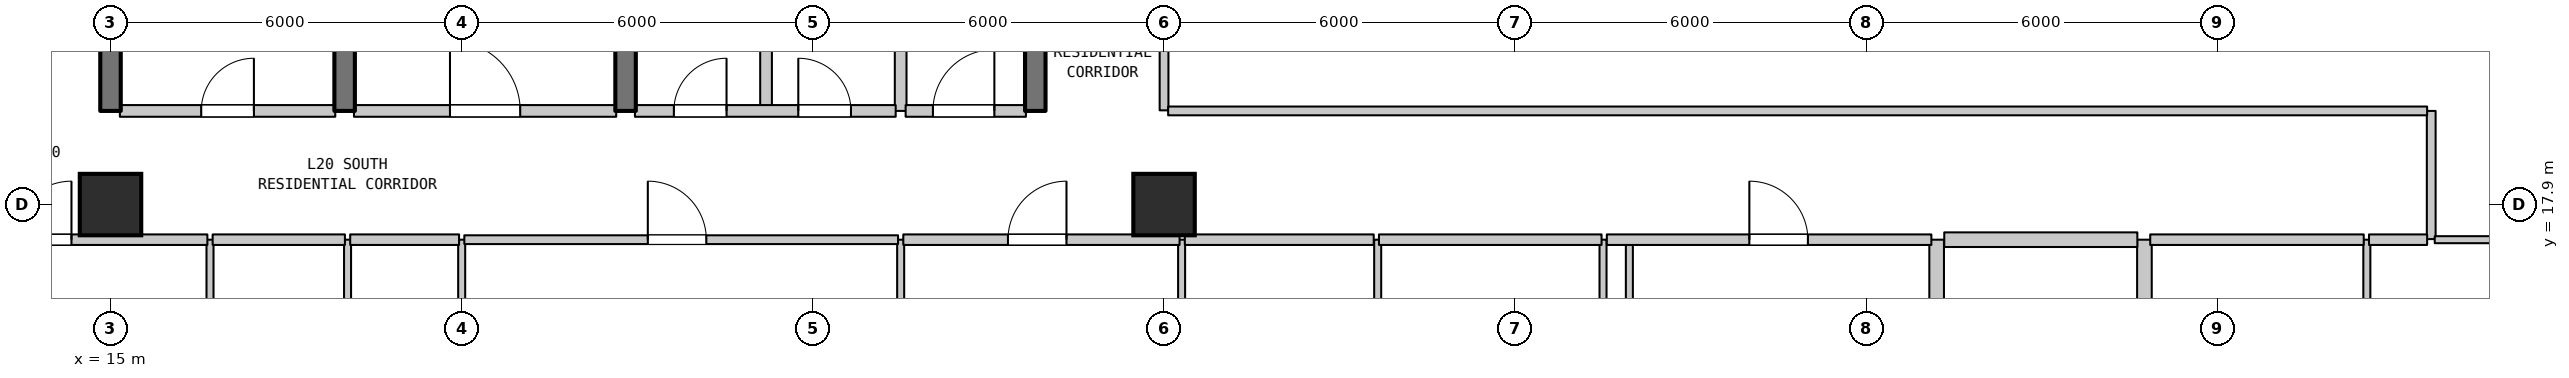
"""IFC4 building model, lengths in metres.
Left out: names, types, materials, properties, quantities, classifications, styles, units other than length and angle.
Written with IfcOpenShell. Run it as: python <this file> out.ifc"""

import sys

from ifc_helpers import new_model, si_unit, direction, frame, frame_2d, origin, origin_2d, place, context, subcontext, project, spatial, rectangle, extrude, element, fill, save


model = new_model("IFC4")
c1 = context("Model", 3, precision=1e-05, world=origin(), true_north=direction((0.0, 1.0)))
c2 = subcontext(c1, "Body", "Model", "MODEL_VIEW")
j1 = project(units=[si_unit("LENGTHUNIT", "METRE"), si_unit("PLANEANGLEUNIT", "RADIAN")], contexts=[c1])
p1 = place(None, origin())
s1 = spatial("IfcSite", under=j1, at=p1, CompositionType="ELEMENT")
p2 = place(p1, origin())
s2 = spatial("IfcBuilding", under=s1, at=p2, CompositionType="ELEMENT")
p3 = place(p2, frame((0.0, 0.0, 86.4)))
s3 = spatial("IfcBuildingStorey", under=s2, at=p3, CompositionType="ELEMENT", Elevation=86.4)
for number, where, z_axis, x_axis in (
    (1, (15.0, 17.9, 0.0), (0.0, 0.0, 1.0), (1.0, 0.0, 0.0)),
    (2, (33.0, 17.9, 0.0), (0.0, 0.0, 1.0), (1.0, 0.0, 0.0)),
):
    element("IfcColumn", number, at=place(p3, frame(where, z_axis=z_axis, x_axis=x_axis)), inside=s3, PredefinedType="COLUMN", context=c2, shape_type="SweptSolid", body=[
        extrude(rectangle(XDim=1.05, YDim=1.05, at=origin_2d()), origin(), (0.0, 0.0, 1.0), 4.5),
    ])
p4 = place(p3, frame((15.0, 19.5, 0.0), z_axis=(0.0, 0.0, 1.0), x_axis=(0.0, 1.0, 0.0)))
e3 = element("IfcWall", 3, at=p4, inside=s3, PredefinedType="SHEAR", context=c2, shape_type="SweptSolid", body=[
    extrude(rectangle(XDim=3.2, YDim=0.35, at=frame_2d((1.6, 0.0))), origin(), (0.0, 0.0, 1.0), 4.185),
])
p5 = place(p3, frame((16.7, 14.1, 0.0), z_axis=(0.0, 0.0, 1.0), x_axis=(0.0, 1.0, 0.0)))
e4 = element("IfcWall", 4, at=p5, inside=s3, PredefinedType="PARTITIONING", context=c2, shape_type="SweptSolid", body=[
    extrude(rectangle(XDim=3.2, YDim=0.12, at=frame_2d((1.6, 0.0))), origin(), (0.0, 0.0, 1.0), 4.185),
])
p6 = place(p5, frame((1.15, 0.0, 0.0)))
e5 = element("IfcOpeningElement", 5, at=p6, cuts=e4, PredefinedType="OPENING", context=c2, shape_type="SweptSolid", body=[
    extrude(rectangle(XDim=0.9, YDim=2.15, at=frame_2d((0.45, 1.075))), frame((0.0, 0.07, 0.0), z_axis=(0.0, -1.0, 0.0), x_axis=(1.0, 0.0, 0.0)), (0.0, 0.0, 1.0), 0.14),
])
p7 = place(p3, frame((19.0, 19.5, 0.0), z_axis=(0.0, 0.0, 1.0), x_axis=(0.0, 1.0, 0.0)))
e6 = element("IfcWall", 6, at=p7, inside=s3, PredefinedType="SHEAR", context=c2, shape_type="SweptSolid", body=[
    extrude(rectangle(XDim=3.2, YDim=0.35, at=frame_2d((1.6, 0.0))), origin(), (0.0, 0.0, 1.0), 4.185),
])
p8 = place(p3, frame((19.05, 14.1, 0.0), z_axis=(0.0, 0.0, 1.0), x_axis=(0.0, 1.0, 0.0)))
e7 = element("IfcWall", 7, at=p8, inside=s3, PredefinedType="PARTITIONING", context=c2, shape_type="SweptSolid", body=[
    extrude(rectangle(XDim=3.2, YDim=0.12, at=frame_2d((1.6, 0.0))), origin(), (0.0, 0.0, 1.0), 4.185),
])
p9 = place(p3, frame((21.0, 6.71, 0.0), z_axis=(0.0, 0.0, 1.0), x_axis=(0.0, 1.0, 0.0)))
e8 = element("IfcWall", 8, at=p9, inside=s3, PredefinedType="PARTITIONING", context=c2, shape_type="SweptSolid", body=[
    extrude(rectangle(XDim=10.59, YDim=0.12, at=frame_2d((5.295, 0.0))), origin(), (0.0, 0.0, 1.0), 4.185),
])
p10 = place(p3, frame((23.8, 19.5, 0.0), z_axis=(0.0, 0.0, 1.0), x_axis=(0.0, 1.0, 0.0)))
e9 = element("IfcWall", 9, at=p10, inside=s3, PredefinedType="SHEAR", context=c2, shape_type="SweptSolid", body=[
    extrude(rectangle(XDim=3.2, YDim=0.35, at=frame_2d((1.6, 0.0))), origin(), (0.0, 0.0, 1.0), 4.185),
])
p11 = place(p3, frame((26.2, 19.5, 0.0), z_axis=(0.0, 0.0, 1.0), x_axis=(0.0, 1.0, 0.0)))
e10 = element("IfcWall", 10, at=p11, inside=s3, PredefinedType="STANDARD", context=c2, shape_type="SweptSolid", body=[
    extrude(rectangle(XDim=3.2, YDim=0.2, at=frame_2d((1.6, 0.0))), origin(), (0.0, 0.0, 1.0), 4.185),
])
p12 = place(p3, frame((28.5, 14.85, 0.0), z_axis=(0.0, 0.0, 1.0), x_axis=(0.0, 1.0, 0.0)))
e11 = element("IfcWall", 11, at=p12, inside=s3, PredefinedType="PARTITIONING", context=c2, shape_type="SweptSolid", body=[
    extrude(rectangle(XDim=2.45, YDim=0.12, at=frame_2d((1.225, 0.0))), origin(), (0.0, 0.0, 1.0), 4.185),
])
p13 = place(p3, frame((28.5, 19.5, 0.0), z_axis=(0.0, 0.0, 1.0), x_axis=(0.0, 1.0, 0.0)))
e12 = element("IfcWall", 12, at=p13, inside=s3, PredefinedType="STANDARD", context=c2, shape_type="SweptSolid", body=[
    extrude(rectangle(XDim=3.2, YDim=0.2, at=frame_2d((1.6, 0.0))), origin(), (0.0, 0.0, 1.0), 4.185),
])
p14 = place(p3, frame((30.8, 19.5, 0.0), z_axis=(0.0, 0.0, 1.0), x_axis=(0.0, 1.0, 0.0)))
e13 = element("IfcWall", 13, at=p14, inside=s3, PredefinedType="SHEAR", context=c2, shape_type="SweptSolid", body=[
    extrude(rectangle(XDim=3.2, YDim=0.35, at=frame_2d((1.6, 0.0))), origin(), (0.0, 0.0, 1.0), 4.185),
])
p15 = place(p3, frame((33.0, 19.51, 0.0), z_axis=(0.0, 0.0, 1.0), x_axis=(0.0, 1.0, 0.0)))
e14 = element("IfcWall", 14, at=p15, inside=s3, PredefinedType="STANDARD", context=c2, shape_type="SweptSolid", body=[
    extrude(rectangle(XDim=6.18, YDim=0.15, at=frame_2d((3.09, 0.0))), origin(), (0.0, 0.0, 1.0), 3.735),
])
for number, where, z_axis, x_axis in (
    (15, (33.3, 11.15, 0.0), (0.0, 0.0, 1.0), (0.0, 1.0, 0.0)),
    (16, (36.65, 11.15, 0.0), (0.0, 0.0, 1.0), (0.0, 1.0, 0.0)),
    (17, (40.5, 11.15, 0.0), (0.0, 0.0, 1.0), (0.0, 1.0, 0.0)),
):
    element("IfcWall", number, at=place(p3, frame(where, z_axis=z_axis, x_axis=x_axis)), inside=s3, PredefinedType="PARTITIONING", context=c2, shape_type="SweptSolid", body=[
        extrude(rectangle(XDim=6.15, YDim=0.12, at=frame_2d((3.075, 0.0))), origin(), (0.0, 0.0, 1.0), 4.185),
    ])
p16 = place(p3, frame((40.95, 14.85, 0.0), z_axis=(0.0, 0.0, 1.0), x_axis=(0.0, 1.0, 0.0)))
e18 = element("IfcWall", 18, at=p16, inside=s3, PredefinedType="PARTITIONING", context=c2, shape_type="SweptSolid", body=[
    extrude(rectangle(XDim=2.45, YDim=0.12, at=frame_2d((1.225, 0.0))), origin(), (0.0, 0.0, 1.0), 4.185),
])
for number, where, z_axis, x_axis in (
    (19, (46.2, 11.15, 0.0), (0.0, 0.0, 1.0), (0.0, 1.0, 0.0)),
    (20, (49.75, 11.15, 0.0), (0.0, 0.0, 1.0), (0.0, 1.0, 0.0)),
):
    element("IfcWall", number, at=place(p3, frame(where, z_axis=z_axis, x_axis=x_axis)), inside=s3, PredefinedType="STANDARD", context=c2, shape_type="SweptSolid", body=[
        extrude(rectangle(XDim=6.15, YDim=0.25, at=frame_2d((3.075, 0.0))), origin(), (0.0, 0.0, 1.0), 4.185),
    ])
p17 = place(p3, frame((53.55, 11.15, 0.0), z_axis=(0.0, 0.0, 1.0), x_axis=(0.0, 1.0, 0.0)))
e21 = element("IfcWall", 21, at=p17, inside=s3, PredefinedType="PARTITIONING", context=c2, shape_type="SweptSolid", body=[
    extrude(rectangle(XDim=6.15, YDim=0.12, at=frame_2d((3.075, 0.0))), origin(), (0.0, 0.0, 1.0), 4.185),
])
p18 = place(p3, frame((54.65, 17.31, 0.0), z_axis=(0.0, 0.0, 1.0), x_axis=(0.0, 1.0, 0.0)))
e22 = element("IfcWall", 22, at=p18, inside=s3, PredefinedType="STANDARD", context=c2, shape_type="SweptSolid", body=[
    extrude(rectangle(XDim=2.19, YDim=0.15, at=frame_2d((1.095, 0.0))), origin(), (0.0, 0.0, 1.0), 4.185),
])
p19 = place(p3, frame((12.875, 17.3, 0.0), z_axis=(0.0, 0.0, 1.0), x_axis=(1.0, 0.0, 0.0)))
e23 = element("IfcWall", 23, at=p19, inside=s3, PredefinedType="STANDARD", context=c2, shape_type="SweptSolid", body=[
    extrude(rectangle(XDim=3.78, YDim=0.18, at=frame_2d((1.89, 0.0))), origin(), (0.0, 0.0, 1.0), 4.185),
])
p20 = place(p19, frame((0.458, 0.0, 0.0)))
e24 = element("IfcOpeningElement", 24, at=p20, cuts=e23, PredefinedType="OPENING", context=c2, shape_type="SweptSolid", body=[
    extrude(rectangle(XDim=1.0, YDim=2.15, at=frame_2d((0.5, 1.075))), frame((0.0, 0.1, 0.0), z_axis=(0.0, -1.0, 0.0), x_axis=(1.0, 0.0, 0.0)), (0.0, 0.0, 1.0), 0.2),
])
p21 = place(p3, frame((16.745, 17.3, 0.0), z_axis=(0.0, 0.0, 1.0), x_axis=(1.0, 0.0, 0.0)))
e25 = element("IfcWall", 25, at=p21, inside=s3, PredefinedType="STANDARD", context=c2, shape_type="SweptSolid", body=[
    extrude(rectangle(XDim=2.26, YDim=0.18, at=frame_2d((1.13, 0.0))), origin(), (0.0, 0.0, 1.0), 4.185),
])
p22 = place(p3, frame((19.095, 17.3, 0.0), z_axis=(0.0, 0.0, 1.0), x_axis=(1.0, 0.0, 0.0)))
e26 = element("IfcWall", 26, at=p22, inside=s3, PredefinedType="STANDARD", context=c2, shape_type="SweptSolid", body=[
    extrude(rectangle(XDim=1.86, YDim=0.18, at=frame_2d((0.93, 0.0))), origin(), (0.0, 0.0, 1.0), 4.185),
])
p23 = place(p3, frame((21.045, 17.3, 0.0), z_axis=(0.0, 0.0, 1.0), x_axis=(1.0, 0.0, 0.0)))
e27 = element("IfcWall", 27, at=p23, inside=s3, PredefinedType="STANDARD", context=c2, shape_type="SweptSolid", body=[
    extrude(rectangle(XDim=7.41, YDim=0.15, at=frame_2d((3.705, 0.0))), origin(), (0.0, 0.0, 1.0), 4.185),
])
p24 = place(p23, frame((3.135, 0.0, 0.0)))
e28 = element("IfcOpeningElement", 28, at=p24, cuts=e27, PredefinedType="OPENING", context=c2, shape_type="SweptSolid", body=[
    extrude(rectangle(XDim=1.0, YDim=2.15, at=frame_2d((0.5, 1.075))), frame((0.0, 0.085, 0.0), z_axis=(0.0, -1.0, 0.0), x_axis=(1.0, 0.0, 0.0)), (0.0, 0.0, 1.0), 0.17),
])
p25 = place(p3, frame((28.545, 17.3, 0.0), z_axis=(0.0, 0.0, 1.0), x_axis=(1.0, 0.0, 0.0)))
e29 = element("IfcWall", 29, at=p25, inside=s3, PredefinedType="STANDARD", context=c2, shape_type="SweptSolid", body=[
    extrude(rectangle(XDim=4.72, YDim=0.18, at=frame_2d((2.36, 0.0))), origin(), (0.0, 0.0, 1.0), 4.185),
])
p26 = place(p25, frame((1.788, 0.0, 0.0)))
e30 = element("IfcOpeningElement", 30, at=p26, cuts=e29, PredefinedType="OPENING", context=c2, shape_type="SweptSolid", body=[
    extrude(rectangle(XDim=1.0, YDim=2.15, at=frame_2d((0.5, 1.075))), frame((0.0, 0.1, 0.0), z_axis=(0.0, -1.0, 0.0), x_axis=(1.0, 0.0, 0.0)), (0.0, 0.0, 1.0), 0.2),
])
p27 = place(p3, frame((33.355, 17.3, 0.0), z_axis=(0.0, 0.0, 1.0), x_axis=(1.0, 0.0, 0.0)))
e31 = element("IfcWall", 31, at=p27, inside=s3, PredefinedType="STANDARD", context=c2, shape_type="SweptSolid", body=[
    extrude(rectangle(XDim=3.227, YDim=0.18, at=frame_2d((1.614, 0.0))), origin(), (0.0, 0.0, 1.0), 4.185),
])
p28 = place(p3, frame((36.672, 17.3, 0.0), z_axis=(0.0, 0.0, 1.0), x_axis=(1.0, 0.0, 0.0)))
e32 = element("IfcWall", 32, at=p28, inside=s3, PredefinedType="STANDARD", context=c2, shape_type="SweptSolid", body=[
    extrude(rectangle(XDim=3.803, YDim=0.18, at=frame_2d((1.901, 0.0))), origin(), (0.0, 0.0, 1.0), 4.185),
])
p29 = place(p3, frame((40.565, 17.3, 0.0), z_axis=(0.0, 0.0, 1.0), x_axis=(1.0, 0.0, 0.0)))
e33 = element("IfcWall", 33, at=p29, inside=s3, PredefinedType="STANDARD", context=c2, shape_type="SweptSolid", body=[
    extrude(rectangle(XDim=5.545, YDim=0.18, at=frame_2d((2.772, 0.0))), origin(), (0.0, 0.0, 1.0), 4.185),
])
p30 = place(p29, frame((2.435, 0.0, 0.0)))
e34 = element("IfcOpeningElement", 34, at=p30, cuts=e33, PredefinedType="OPENING", context=c2, shape_type="SweptSolid", body=[
    extrude(rectangle(XDim=1.0, YDim=2.15, at=frame_2d((0.5, 1.075))), frame((0.0, 0.1, 0.0), z_axis=(0.0, -1.0, 0.0), x_axis=(1.0, 0.0, 0.0)), (0.0, 0.0, 1.0), 0.2),
])
p31 = place(p3, frame((46.33, 17.3, 0.0), z_axis=(0.0, 0.0, 1.0), x_axis=(1.0, 0.0, 0.0)))
e35 = element("IfcWall", 35, at=p31, inside=s3, PredefinedType="STANDARD", context=c2, shape_type="SweptSolid", body=[
    extrude(rectangle(XDim=3.299, YDim=0.25, at=frame_2d((1.649, 0.0))), origin(), (0.0, 0.0, 1.0), 4.185),
])
p32 = place(p3, frame((49.849, 17.3, 0.0), z_axis=(0.0, 0.0, 1.0), x_axis=(1.0, 0.0, 0.0)))
e36 = element("IfcWall", 36, at=p32, inside=s3, PredefinedType="STANDARD", context=c2, shape_type="SweptSolid", body=[
    extrude(rectangle(XDim=3.648, YDim=0.18, at=frame_2d((1.824, 0.0))), origin(), (0.0, 0.0, 1.0), 4.185),
])
p33 = place(p3, frame((53.587, 17.3, 0.0), z_axis=(0.0, 0.0, 1.0), x_axis=(1.0, 0.0, 0.0)))
e37 = element("IfcWall", 37, at=p33, inside=s3, PredefinedType="STANDARD", context=c2, shape_type="SweptSolid", body=[
    extrude(rectangle(XDim=0.993, YDim=0.18, at=frame_2d((0.497, 0.0))), origin(), (0.0, 0.0, 1.0), 4.185),
])
p34 = place(p3, frame((54.71, 17.3, 0.0), z_axis=(0.0, 0.0, 1.0), x_axis=(1.0, 0.0, 0.0)))
e38 = element("IfcWall", 38, at=p34, inside=s3, PredefinedType="PARTITIONING", context=c2, shape_type="SweptSolid", body=[
    extrude(rectangle(XDim=1.635, YDim=0.12, at=frame_2d((0.817, 0.0))), origin(), (0.0, 0.0, 1.0), 4.185),
])
p35 = place(p3, frame((15.16, 19.5, 0.0), z_axis=(0.0, 0.0, 1.0), x_axis=(1.0, 0.0, 0.0)))
e39 = element("IfcWall", 39, at=p35, inside=s3, PredefinedType="STANDARD", context=c2, shape_type="SweptSolid", body=[
    extrude(rectangle(XDim=3.68, YDim=0.2, at=frame_2d((1.84, 0.0))), origin(), (0.0, 0.0, 1.0), 4.185),
])
p36 = place(p35, frame((1.39, 0.0, 0.0)))
e40 = element("IfcOpeningElement", 40, at=p36, cuts=e39, PredefinedType="OPENING", context=c2, shape_type="SweptSolid", body=[
    extrude(rectangle(XDim=0.9, YDim=2.15, at=frame_2d((0.45, 1.075))), frame((0.0, 0.11, 0.0), z_axis=(0.0, -1.0, 0.0), x_axis=(1.0, 0.0, 0.0)), (0.0, 0.0, 1.0), 0.22),
])
p37 = place(p3, frame((19.16, 19.5, 0.0), z_axis=(0.0, 0.0, 1.0), x_axis=(1.0, 0.0, 0.0)))
e41 = element("IfcWall", 41, at=p37, inside=s3, PredefinedType="STANDARD", context=c2, shape_type="SweptSolid", body=[
    extrude(rectangle(XDim=4.48, YDim=0.2, at=frame_2d((2.24, 0.0))), origin(), (0.0, 0.0, 1.0), 4.185),
])
p38 = place(p37, frame((1.64, 0.0, 0.0)))
e42 = element("IfcOpeningElement", 42, at=p38, cuts=e41, PredefinedType="OPENING", context=c2, shape_type="SweptSolid", body=[
    extrude(rectangle(XDim=1.2, YDim=2.2, at=frame_2d((0.6, 1.1))), frame((0.0, 0.11, 0.0), z_axis=(0.0, -1.0, 0.0), x_axis=(1.0, 0.0, 0.0)), (0.0, 0.0, 1.0), 0.22),
])
p39 = place(p3, frame((23.96, 19.5, 0.0), z_axis=(0.0, 0.0, 1.0), x_axis=(1.0, 0.0, 0.0)))
e43 = element("IfcWall", 43, at=p39, inside=s3, PredefinedType="STANDARD", context=c2, shape_type="SweptSolid", body=[
    extrude(rectangle(XDim=4.455, YDim=0.2, at=frame_2d((2.228, 0.0))), origin(), (0.0, 0.0, 1.0), 4.185),
])
p40 = place(p39, frame((0.665, 0.0, 0.0)))
e44 = element("IfcOpeningElement", 44, at=p40, cuts=e43, PredefinedType="OPENING", context=c2, shape_type="SweptSolid", body=[
    extrude(rectangle(XDim=0.9, YDim=2.15, at=frame_2d((0.45, 1.075))), frame((0.0, 0.11, 0.0), z_axis=(0.0, -1.0, 0.0), x_axis=(1.0, 0.0, 0.0)), (0.0, 0.0, 1.0), 0.22),
])
p41 = place(p39, frame((2.791, 0.0, 0.0)))
e45 = element("IfcOpeningElement", 45, at=p41, cuts=e43, PredefinedType="OPENING", context=c2, shape_type="SweptSolid", body=[
    extrude(rectangle(XDim=0.9, YDim=2.15, at=frame_2d((0.45, 1.075))), frame((0.0, 0.11, 0.0), z_axis=(0.0, -1.0, 0.0), x_axis=(1.0, 0.0, 0.0)), (0.0, 0.0, 1.0), 0.22),
])
p42 = place(p3, frame((28.585, 19.5, 0.0), z_axis=(0.0, 0.0, 1.0), x_axis=(1.0, 0.0, 0.0)))
e46 = element("IfcWall", 46, at=p42, inside=s3, PredefinedType="STANDARD", context=c2, shape_type="SweptSolid", body=[
    extrude(rectangle(XDim=2.055, YDim=0.2, at=frame_2d((1.027, 0.0))), origin(), (0.0, 0.0, 1.0), 4.185),
])
p43 = place(p42, frame((0.466, 0.0, 0.0)))
e47 = element("IfcOpeningElement", 47, at=p43, cuts=e46, PredefinedType="OPENING", context=c2, shape_type="SweptSolid", body=[
    extrude(rectangle(XDim=1.05, YDim=2.15, at=frame_2d((0.525, 1.075))), frame((0.0, 0.11, 0.0), z_axis=(0.0, -1.0, 0.0), x_axis=(1.0, 0.0, 0.0)), (0.0, 0.0, 1.0), 0.22),
])
p44 = place(p3, frame((33.07, 19.5, 0.0), z_axis=(0.0, 0.0, 1.0), x_axis=(1.0, 0.0, 0.0)))
e48 = element("IfcWall", 48, at=p44, inside=s3, PredefinedType="STANDARD", context=c2, shape_type="SweptSolid", body=[
    extrude(rectangle(XDim=21.51, YDim=0.15, at=frame_2d((10.755, 0.0))), origin(), (0.0, 0.0, 1.0), 4.185),
])
p45 = place(p20, origin())
e49 = element("IfcDoor", 49, at=p45, inside=s3, OperationType="SINGLE_SWING_RIGHT", PredefinedType="DOOR", context=c2, shape_type="SweptSolid", body=[
    extrude(rectangle(XDim=1.0, YDim=2.15, at=frame_2d((0.5, 1.075))), frame((0.0, 0.025, 0.0), z_axis=(0.0, -1.0, 0.0), x_axis=(1.0, 0.0, 0.0)), (0.0, 0.0, 1.0), 0.05),
])
fill(e24, e49)
p46 = place(p24, origin())
e50 = element("IfcDoor", 50, at=p46, inside=s3, OperationType="SINGLE_SWING_LEFT", PredefinedType="DOOR", context=c2, shape_type="SweptSolid", body=[
    extrude(rectangle(XDim=1.0, YDim=2.15, at=frame_2d((0.5, 1.075))), frame((0.0, 0.025, 0.0), z_axis=(0.0, -1.0, 0.0), x_axis=(1.0, 0.0, 0.0)), (0.0, 0.0, 1.0), 0.05),
])
fill(e28, e50)
p47 = place(p26, origin())
e51 = element("IfcDoor", 51, at=p47, inside=s3, OperationType="SINGLE_SWING_RIGHT", PredefinedType="DOOR", context=c2, shape_type="SweptSolid", body=[
    extrude(rectangle(XDim=1.0, YDim=2.15, at=frame_2d((0.5, 1.075))), frame((0.0, 0.025, 0.0), z_axis=(0.0, -1.0, 0.0), x_axis=(1.0, 0.0, 0.0)), (0.0, 0.0, 1.0), 0.05),
])
fill(e30, e51)
p48 = place(p30, origin())
e52 = element("IfcDoor", 52, at=p48, inside=s3, OperationType="SINGLE_SWING_LEFT", PredefinedType="DOOR", context=c2, shape_type="SweptSolid", body=[
    extrude(rectangle(XDim=1.0, YDim=2.15, at=frame_2d((0.5, 1.075))), frame((0.0, 0.025, 0.0), z_axis=(0.0, -1.0, 0.0), x_axis=(1.0, 0.0, 0.0)), (0.0, 0.0, 1.0), 0.05),
])
fill(e34, e52)
p49 = place(p36, origin())
e53 = element("IfcDoor", 53, at=p49, inside=s3, OperationType="SINGLE_SWING_RIGHT", PredefinedType="DOOR", context=c2, shape_type="SweptSolid", body=[
    extrude(rectangle(XDim=0.9, YDim=2.15, at=frame_2d((0.45, 1.075))), frame((0.0, 0.025, 0.0), z_axis=(0.0, -1.0, 0.0), x_axis=(1.0, 0.0, 0.0)), (0.0, 0.0, 1.0), 0.05),
])
fill(e40, e53)
p50 = place(p38, origin())
e54 = element("IfcDoor", 54, at=p50, inside=s3, OperationType="SINGLE_SWING_LEFT", PredefinedType="DOOR", context=c2, shape_type="SweptSolid", body=[
    extrude(rectangle(XDim=1.2, YDim=2.2, at=frame_2d((0.6, 1.1))), frame((0.0, 0.025, 0.0), z_axis=(0.0, -1.0, 0.0), x_axis=(1.0, 0.0, 0.0)), (0.0, 0.0, 1.0), 0.05),
])
fill(e42, e54)
p51 = place(p40, origin())
e55 = element("IfcDoor", 55, at=p51, inside=s3, OperationType="SINGLE_SWING_RIGHT", PredefinedType="DOOR", context=c2, shape_type="SweptSolid", body=[
    extrude(rectangle(XDim=0.9, YDim=2.15, at=frame_2d((0.45, 1.075))), frame((0.0, 0.025, 0.0), z_axis=(0.0, -1.0, 0.0), x_axis=(1.0, 0.0, 0.0)), (0.0, 0.0, 1.0), 0.05),
])
fill(e44, e55)
p52 = place(p41, origin())
e56 = element("IfcDoor", 56, at=p52, inside=s3, OperationType="SINGLE_SWING_LEFT", PredefinedType="DOOR", context=c2, shape_type="SweptSolid", body=[
    extrude(rectangle(XDim=0.9, YDim=2.15, at=frame_2d((0.45, 1.075))), frame((0.0, 0.025, 0.0), z_axis=(0.0, -1.0, 0.0), x_axis=(1.0, 0.0, 0.0)), (0.0, 0.0, 1.0), 0.05),
])
fill(e45, e56)
p53 = place(p43, origin())
e57 = element("IfcDoor", 57, at=p53, inside=s3, OperationType="SINGLE_SWING_RIGHT", PredefinedType="DOOR", context=c2, shape_type="SweptSolid", body=[
    extrude(rectangle(XDim=1.05, YDim=2.15, at=frame_2d((0.525, 1.075))), frame((0.0, 0.025, 0.0), z_axis=(0.0, -1.0, 0.0), x_axis=(1.0, 0.0, 0.0)), (0.0, 0.0, 1.0), 0.05),
])
fill(e47, e57)
save(model, sys.argv[1])
